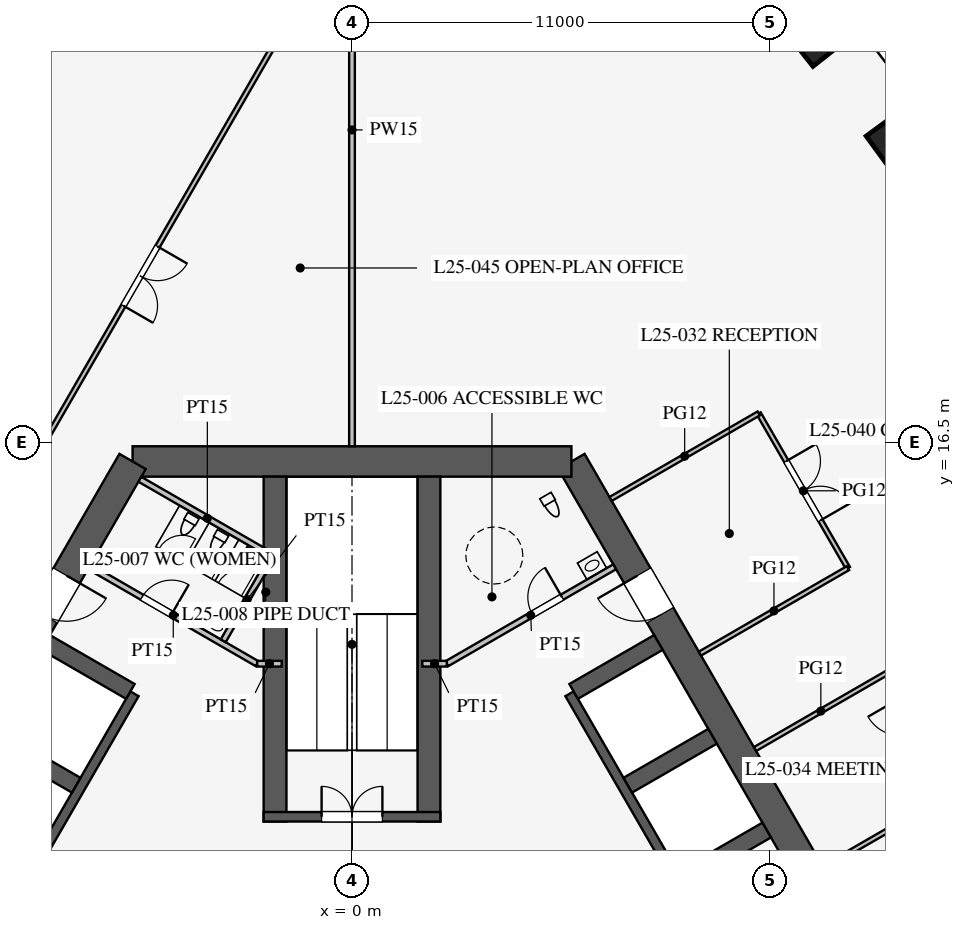
"""IFC4 building model, lengths in metres.
Left out: names, types, materials, properties, quantities, classifications, styles, units other than length and angle.
Written with IfcOpenShell. Run it as: python <this file> out.ifc"""

import sys

from ifc_helpers import new_model, si_unit, direction, frame, frame_2d, origin, origin_2d, place, context, subcontext, project, spatial, rectangle, extrude, element, fill, save


model = new_model("IFC4")
c1 = context("Model", 3, precision=1e-05, world=origin(), true_north=direction((0.0, 1.0)))
c2 = subcontext(c1, "Body", "Model", "MODEL_VIEW")
j1 = project(units=[si_unit("LENGTHUNIT", "METRE"), si_unit("PLANEANGLEUNIT", "RADIAN")], contexts=[c1])
p1 = place(None, origin())
s1 = spatial("IfcSite", under=j1, at=p1, CompositionType="ELEMENT")
p2 = place(p1, origin())
s2 = spatial("IfcBuilding", under=s1, at=p2, CompositionType="ELEMENT")
p3 = place(p2, frame((0.0, 0.0, 111.5)))
s3 = spatial("IfcBuildingStorey", under=s2, at=p3, CompositionType="ELEMENT", Elevation=111.5)
for number, where, z_axis, x_axis in (
    (1, (14.825, 24.148, 0.0), (0.0, 0.0, 1.0), (-0.591, 0.807, 0.0)),
    (2, (12.077, 27.757, 0.0), (0.0, 0.0, 1.0), (-0.62, 0.785, 0.0)),
):
    element("IfcColumn", number, at=place(p3, frame(where, z_axis=z_axis, x_axis=x_axis)), inside=s3, PredefinedType="COLUMN", context=c2, shape_type="SweptSolid", body=[
        extrude(rectangle(XDim=2.2, YDim=1.6, at=origin_2d()), origin(), (0.0, 0.0, 1.0), 4.2),
    ])
p4 = place(p3, frame((16.743, -3.0, 0.0), z_axis=(0.0, 0.0, 1.0), x_axis=(-0.500002442456, 0.866023993627, 0.0)))
e3 = element("IfcWall", 3, at=p4, inside=s3, PredefinedType="SHEAR", context=c2, shape_type="SweptSolid", body=[
    extrude(rectangle(XDim=21.939, YDim=0.8, at=frame_2d((10.97, 0.0))), origin(), (0.0, 0.0, 1.0), 4.2),
])
p5 = place(p4, frame((17.27, 0.0, 0.0)))
e4 = element("IfcOpeningElement", 4, at=p5, cuts=e3, PredefinedType="OPENING", context=c2, shape_type="SweptSolid", body=[
    extrude(rectangle(XDim=1.2, YDim=2.1, at=frame_2d((0.6, 1.05))), frame((0.0, 0.41, 0.0), z_axis=(0.0, -1.0, 0.0), x_axis=(1.0, 0.0, 0.0)), (0.0, 0.0, 1.0), 0.82),
])
p6 = place(p4, frame((3.47, 0.0, 0.0)))
e5 = element("IfcOpeningElement", 5, at=p6, cuts=e3, PredefinedType="OPENING", context=c2, shape_type="SweptSolid", body=[
    extrude(rectangle(XDim=1.2, YDim=2.1, at=frame_2d((0.6, 1.05))), frame((0.0, 0.41, 0.0), z_axis=(0.0, -1.0, 0.0), x_axis=(1.0, 0.0, 0.0)), (0.0, 0.0, 1.0), 0.82),
])
p7 = place(p3, frame((5.773, 16.0, 0.0), z_axis=(0.0, 0.0, 1.0), x_axis=(-1.0, 0.0, 0.0)))
e6 = element("IfcWall", 6, at=p7, inside=s3, PredefinedType="SHEAR", context=c2, shape_type="SweptSolid", body=[
    extrude(rectangle(XDim=11.547, YDim=0.8, at=frame_2d((5.773, 0.0))), origin(), (0.0, 0.0, 1.0), 4.2),
])
p8 = place(p3, frame((-5.773, 16.0, 0.0), z_axis=(0.0, 0.0, 1.0), x_axis=(-0.500002442456, -0.866023993627, 0.0)))
e7 = element("IfcWall", 7, at=p8, inside=s3, PredefinedType="SHEAR", context=c2, shape_type="SweptSolid", body=[
    extrude(rectangle(XDim=21.939, YDim=0.8, at=frame_2d((10.97, 0.0))), origin(), (0.0, 0.0, 1.0), 4.2),
])
p9 = place(p8, frame((17.27, 0.0, 0.0)))
e8 = element("IfcOpeningElement", 8, at=p9, cuts=e7, PredefinedType="OPENING", context=c2, shape_type="SweptSolid", body=[
    extrude(rectangle(XDim=1.2, YDim=2.1, at=frame_2d((0.6, 1.05))), frame((0.0, 0.41, 0.0), z_axis=(0.0, -1.0, 0.0), x_axis=(1.0, 0.0, 0.0)), (0.0, 0.0, 1.0), 0.82),
])
p10 = place(p8, frame((3.47, 0.0, 0.0)))
e9 = element("IfcOpeningElement", 9, at=p10, cuts=e7, PredefinedType="OPENING", context=c2, shape_type="SweptSolid", body=[
    extrude(rectangle(XDim=1.2, YDim=2.1, at=frame_2d((0.6, 1.05))), frame((0.0, 0.41, 0.0), z_axis=(0.0, -1.0, 0.0), x_axis=(1.0, 0.0, 0.0)), (0.0, 0.0, 1.0), 0.82),
])
p11 = place(p3, frame((11.424, 0.014, 0.0), z_axis=(0.0, 0.0, 1.0), x_axis=(-0.500001763848, 0.866024385424, 0.0)))
e10 = element("IfcWall", 10, at=p11, inside=s3, PredefinedType="SHEAR", context=c2, shape_type="SweptSolid", body=[
    extrude(rectangle(XDim=11.4, YDim=0.25, at=frame_2d((5.7, 0.0))), origin(), (0.0, 0.0, 1.0), 4.2),
])
p12 = place(p11, frame((0.975, 0.0, 0.0)))
e11 = element("IfcOpeningElement", 11, at=p12, cuts=e10, PredefinedType="OPENING", context=c2, shape_type="SweptSolid", body=[
    extrude(rectangle(XDim=0.9, YDim=2.1, at=frame_2d((0.45, 1.05))), frame((0.0, 0.135, 0.0), z_axis=(0.0, -1.0, 0.0), x_axis=(1.0, 0.0, 0.0)), (0.0, 0.0, 1.0), 0.27),
])
p13 = place(p11, frame((3.825, 0.0, 0.0)))
e12 = element("IfcOpeningElement", 12, at=p13, cuts=e10, PredefinedType="OPENING", context=c2, shape_type="SweptSolid", body=[
    extrude(rectangle(XDim=0.9, YDim=2.1, at=frame_2d((0.45, 1.05))), frame((0.0, 0.135, 0.0), z_axis=(0.0, -1.0, 0.0), x_axis=(1.0, 0.0, 0.0)), (0.0, 0.0, 1.0), 0.27),
])
for number, where, z_axis, x_axis in (
    (13, (8.682, 5.012, 0.0), (0.0, 0.0, 1.0), (0.866, 0.5, 0.0)),
    (14, (7.257, 7.481, 0.0), (0.0, 0.0, 1.0), (0.866, 0.5, 0.0)),
):
    element("IfcWall", number, at=place(p3, frame(where, z_axis=z_axis, x_axis=x_axis)), inside=s3, PredefinedType="SHEAR", context=c2, shape_type="SweptSolid", body=[
        extrude(rectangle(XDim=2.575, YDim=0.45, at=frame_2d((1.288, 0.0))), origin(), (0.0, 0.0, 1.0), 4.2),
    ])
p14 = place(p3, frame((5.832, 9.949, 0.0), z_axis=(0.0, 0.0, 1.0), x_axis=(0.866029291668, 0.499993265928, 0.0)))
e15 = element("IfcWall", 15, at=p14, inside=s3, PredefinedType="SHEAR", context=c2, shape_type="SweptSolid", body=[
    extrude(rectangle(XDim=2.575, YDim=0.45, at=frame_2d((1.288, 0.0))), origin(), (0.0, 0.0, 1.0), 4.2),
])
p15 = place(p3, frame((-5.724, 9.886, 0.0), z_axis=(0.0, 0.0, 1.0), x_axis=(-0.500001763848, -0.866024385424, 0.0)))
e16 = element("IfcWall", 16, at=p15, inside=s3, PredefinedType="SHEAR", context=c2, shape_type="SweptSolid", body=[
    extrude(rectangle(XDim=11.4, YDim=0.25, at=frame_2d((5.7, 0.0))), origin(), (0.0, 0.0, 1.0), 4.2),
])
p16 = place(p15, frame((6.525, 0.0, 0.0)))
e17 = element("IfcOpeningElement", 17, at=p16, cuts=e16, PredefinedType="OPENING", context=c2, shape_type="SweptSolid", body=[
    extrude(rectangle(XDim=1.2, YDim=2.2, at=frame_2d((0.6, 1.1))), frame((0.0, 0.135, 0.0), z_axis=(0.0, -1.0, 0.0), x_axis=(1.0, 0.0, 0.0)), (0.0, 0.0, 1.0), 0.27),
])
p17 = place(p15, frame((9.375, 0.0, 0.0)))
e18 = element("IfcOpeningElement", 18, at=p17, cuts=e16, PredefinedType="OPENING", context=c2, shape_type="SweptSolid", body=[
    extrude(rectangle(XDim=1.2, YDim=2.2, at=frame_2d((0.6, 1.1))), frame((0.0, 0.135, 0.0), z_axis=(0.0, -1.0, 0.0), x_axis=(1.0, 0.0, 0.0)), (0.0, 0.0, 1.0), 0.27),
])
p18 = place(p3, frame((-5.832, 9.949, 0.0), z_axis=(0.0, 0.0, 1.0), x_axis=(-0.866029291668, 0.499993265928, 0.0)))
e19 = element("IfcWall", 19, at=p18, inside=s3, PredefinedType="SHEAR", context=c2, shape_type="SweptSolid", body=[
    extrude(rectangle(XDim=2.575, YDim=0.45, at=frame_2d((1.288, 0.0))), origin(), (0.0, 0.0, 1.0), 4.2),
])
p19 = place(p3, frame((-7.257, 7.481, 0.0), z_axis=(0.0, 0.0, 1.0), x_axis=(-0.866046643894, 0.499963209246, 0.0)))
e20 = element("IfcWall", 20, at=p19, inside=s3, PredefinedType="SHEAR", context=c2, shape_type="SweptSolid", body=[
    extrude(rectangle(XDim=2.575, YDim=0.45, at=frame_2d((1.288, 0.0))), origin(), (0.0, 0.0, 1.0), 4.2),
])
for number, where, z_axis, x_axis in (
    (21, (2.025, 6.525, 0.0), (0.0, 0.0, 1.0), (0.0, 1.0, 0.0)),
    (22, (-2.025, 6.525, 0.0), (0.0, 0.0, 1.0), (0.0, 1.0, 0.0)),
):
    element("IfcWall", number, at=place(p3, frame(where, z_axis=z_axis, x_axis=x_axis)), inside=s3, PredefinedType="SHEAR", context=c2, shape_type="SweptSolid", body=[
        extrude(rectangle(XDim=9.075, YDim=0.6, at=frame_2d((4.538, 0.0))), origin(), (0.0, 0.0, 1.0), 4.2),
    ])
p20 = place(p3, frame((2.325, 6.65, 0.0), z_axis=(0.0, 0.0, 1.0), x_axis=(-1.0, 0.0, 0.0)))
e23 = element("IfcWall", 23, at=p20, inside=s3, PredefinedType="SHEAR", context=c2, shape_type="SweptSolid", body=[
    extrude(rectangle(XDim=4.65, YDim=0.25, at=frame_2d((2.325, 0.0))), origin(), (0.0, 0.0, 1.0), 4.2),
])
p21 = place(p20, frame((1.525, 0.0, 0.0)))
e24 = element("IfcOpeningElement", 24, at=p21, cuts=e23, PredefinedType="OPENING", context=c2, shape_type="SweptSolid", body=[
    extrude(rectangle(XDim=1.6, YDim=2.1, at=frame_2d((0.8, 1.05))), frame((0.0, 0.135, 0.0), z_axis=(0.0, -1.0, 0.0), x_axis=(1.0, 0.0, 0.0)), (0.0, 0.0, 1.0), 0.27),
])
p22 = place(p3, frame((2.495, 10.678, 0.0), z_axis=(0.0, 0.0, 1.0), x_axis=(0.86602216432, 0.500005610874, 0.0)))
e25 = element("IfcWall", 25, at=p22, inside=s3, PredefinedType="PARTITIONING", context=c2, shape_type="SweptSolid", body=[
    extrude(rectangle(XDim=5.1, YDim=0.15, at=frame_2d((2.55, 0.0))), origin(), (0.0, 0.0, 1.0), 4.0),
])
p23 = place(p22, frame((2.6, 0.0, 0.0)))
e26 = element("IfcOpeningElement", 26, at=p23, cuts=e25, PredefinedType="OPENING", context=c2, shape_type="SweptSolid", body=[
    extrude(rectangle(XDim=0.9, YDim=2.1, at=frame_2d((0.45, 1.05))), frame((0.0, 0.085, 0.0), z_axis=(0.0, -1.0, 0.0), x_axis=(1.0, 0.0, 0.0)), (0.0, 0.0, 1.0), 0.17),
])
p24 = place(p3, frame((-2.495, 10.678, 0.0), z_axis=(0.0, 0.0, 1.0), x_axis=(-0.86602216432, 0.500005610874, 0.0)))
e27 = element("IfcWall", 27, at=p24, inside=s3, PredefinedType="PARTITIONING", context=c2, shape_type="SweptSolid", body=[
    extrude(rectangle(XDim=5.1, YDim=0.15, at=frame_2d((2.55, 0.0))), origin(), (0.0, 0.0, 1.0), 4.0),
])
p25 = place(p24, frame((2.6, 0.0, 0.0)))
e28 = element("IfcOpeningElement", 28, at=p25, cuts=e27, PredefinedType="OPENING", context=c2, shape_type="SweptSolid", body=[
    extrude(rectangle(XDim=0.9, YDim=2.1, at=frame_2d((0.45, 1.05))), frame((0.0, 0.085, 0.0), z_axis=(0.0, -1.0, 0.0), x_axis=(1.0, 0.0, 0.0)), (0.0, 0.0, 1.0), 0.17),
])
for number, where, z_axis, x_axis in (
    (29, (2.495, 10.678, 0.0), (0.0, 0.0, 1.0), (-1.0, 0.0, 0.0)),
    (30, (-2.495, 10.678, 0.0), (0.0, 0.0, 1.0), (1.0, 0.0, 0.0)),
):
    element("IfcWall", number, at=place(p3, frame(where, z_axis=z_axis, x_axis=x_axis)), inside=s3, PredefinedType="PARTITIONING", context=c2, shape_type="SweptSolid", body=[
        extrude(rectangle(XDim=0.645, YDim=0.15, at=frame_2d((0.323, 0.0))), origin(), (0.0, 0.0, 1.0), 4.0),
    ])
p26 = place(p3, frame((-2.031, 13.482, 0.0), z_axis=(0.0, 0.0, 1.0), x_axis=(-0.866050731258, 0.499956128963, 0.0)))
e31 = element("IfcWall", 31, at=p26, inside=s3, PredefinedType="PARTITIONING", context=c2, shape_type="SweptSolid", body=[
    extrude(rectangle(XDim=4.1, YDim=0.15, at=frame_2d((2.05, 0.0))), origin(), (0.0, 0.0, 1.0), 4.0),
])
p27 = place(p3, frame((-3.389, 11.281, 0.0), z_axis=(0.0, 0.0, 1.0), x_axis=(0.499989096993, 0.866031698547, 0.0)))
e32 = element("IfcWall", 32, at=p27, inside=s3, PredefinedType="PARTITIONING", context=c2, shape_type="SweptSolid", body=[
    extrude(rectangle(XDim=2.51, YDim=0.15, at=frame_2d((1.255, 0.0))), origin(), (0.0, 0.0, 1.0), 4.0),
])
p28 = place(p3, frame((0.0, 16.4, 0.0), z_axis=(0.0, 0.0, 1.0), x_axis=(0.0, 1.0, 0.0)))
e33 = element("IfcWall", 33, at=p28, inside=s3, PredefinedType="PARTITIONING", context=c2, shape_type="SweptSolid", body=[
    extrude(rectangle(XDim=16.65, YDim=0.15, at=frame_2d((8.325, 0.0))), origin(), (0.0, 0.0, 1.0), 2.3),
])
p29 = place(p3, frame((13.052, 13.194, 0.0), z_axis=(0.0, 0.0, 1.0), x_axis=(-0.499977259774, 0.866038532462, 0.0)))
e34 = element("IfcWall", 34, at=p29, inside=s3, PredefinedType="PARTITIONING", context=c2, shape_type="SweptSolid", body=[
    extrude(rectangle(XDim=4.7, YDim=0.12, at=frame_2d((2.35, 0.0))), origin(), (0.0, 0.0, 1.0), 2.9),
])
p30 = place(p29, frame((1.45, 0.0, 0.15)))
e35 = element("IfcOpeningElement", 35, at=p30, cuts=e34, PredefinedType="OPENING", context=c2, shape_type="SweptSolid", body=[
    extrude(rectangle(XDim=1.8, YDim=2.1, at=frame_2d((0.9, 1.05))), frame((0.0, 0.07, 0.0), z_axis=(0.0, -1.0, 0.0), x_axis=(1.0, 0.0, 0.0)), (0.0, 0.0, 1.0), 0.14),
])
p31 = place(p3, frame((15.869, 7.314, 0.0), z_axis=(0.0, 0.0, 1.0), x_axis=(-0.500012057535, 0.866018442252, 0.0)))
e36 = element("IfcWall", 36, at=p31, inside=s3, PredefinedType="PARTITIONING", context=c2, shape_type="SweptSolid", body=[
    extrude(rectangle(XDim=3.6, YDim=0.12, at=frame_2d((1.8, 0.0))), origin(), (0.0, 0.0, 1.0), 2.9),
])
p32 = place(p31, frame((1.85, 0.0, 0.15)))
e37 = element("IfcOpeningElement", 37, at=p32, cuts=e36, PredefinedType="OPENING", context=c2, shape_type="SweptSolid", body=[
    extrude(rectangle(XDim=1.0, YDim=2.1, at=frame_2d((0.5, 1.05))), frame((0.0, 0.07, 0.0), z_axis=(0.0, -1.0, 0.0), x_axis=(1.0, 0.0, 0.0)), (0.0, 0.0, 1.0), 0.14),
])
p33 = place(p3, frame((10.605, 8.432, 0.0), z_axis=(0.0, 0.0, 1.0), x_axis=(0.866026010844, 0.49999894854, 0.0)))
e38 = element("IfcWall", 38, at=p33, inside=s3, PredefinedType="PARTITIONING", context=c2, shape_type="SweptSolid", body=[
    extrude(rectangle(XDim=4.0, YDim=0.12, at=frame_2d((2.0, 0.0))), origin(), (0.0, 0.0, 1.0), 2.9),
])
p34 = place(p3, frame((9.155, 10.944, 0.0), z_axis=(0.0, 0.0, 1.0), x_axis=(0.866017533419, 0.500013631625, 0.0)))
e39 = element("IfcWall", 39, at=p34, inside=s3, PredefinedType="PARTITIONING", context=c2, shape_type="SweptSolid", body=[
    extrude(rectangle(XDim=4.5, YDim=0.12, at=frame_2d((2.25, 0.0))), origin(), (0.0, 0.0, 1.0), 2.9),
])
p35 = place(p3, frame((6.805, 15.014, 0.0), z_axis=(0.0, 0.0, 1.0), x_axis=(0.866031096941, 0.499990139034, 0.0)))
e40 = element("IfcWall", 40, at=p35, inside=s3, PredefinedType="PARTITIONING", context=c2, shape_type="SweptSolid", body=[
    extrude(rectangle(XDim=4.5, YDim=0.12, at=frame_2d((2.25, 0.0))), origin(), (0.0, 0.0, 1.0), 2.9),
])
p36 = place(p3, frame((12.405, 5.314, 0.0), z_axis=(0.0, 0.0, 1.0), x_axis=(0.866026010844, 0.49999894854, 0.0)))
e41 = element("IfcWall", 41, at=p36, inside=s3, PredefinedType="PARTITIONING", context=c2, shape_type="SweptSolid", body=[
    extrude(rectangle(XDim=4.0, YDim=0.12, at=frame_2d((2.0, 0.0))), origin(), (0.0, 0.0, 1.0), 2.9),
])
p37 = place(p3, frame((-0.016, 30.491, 0.0), z_axis=(0.0, 0.0, 1.0), x_axis=(-0.50000091641, -0.866024874695, 0.0)))
e42 = element("IfcWall", 42, at=p37, inside=s3, PredefinedType="PARTITIONING", context=c2, shape_type="SweptSolid", body=[
    extrude(rectangle(XDim=52.796, YDim=0.12, at=frame_2d((26.398, 0.0))), origin(), (0.0, 0.0, 1.0), 2.9),
])
p38 = place(p37, frame((10.2, 0.0, 0.15)))
e43 = element("IfcOpeningElement", 43, at=p38, cuts=e42, PredefinedType="OPENING", context=c2, shape_type="SweptSolid", body=[
    extrude(rectangle(XDim=1.8, YDim=2.1, at=frame_2d((0.9, 1.05))), frame((0.0, 0.07, 0.0), z_axis=(0.0, -1.0, 0.0), x_axis=(1.0, 0.0, 0.0)), (0.0, 0.0, 1.0), 0.14),
])
p39 = place(p37, frame((40.8, 0.0, 0.15)))
e44 = element("IfcOpeningElement", 44, at=p39, cuts=e42, PredefinedType="OPENING", context=c2, shape_type="SweptSolid", body=[
    extrude(rectangle(XDim=1.8, YDim=2.1, at=frame_2d((0.9, 1.05))), frame((0.0, 0.07, 0.0), z_axis=(0.0, -1.0, 0.0), x_axis=(1.0, 0.0, 0.0)), (0.0, 0.0, 1.0), 0.14),
])
p40 = place(p23, origin())
e45 = element("IfcDoor", 45, at=p40, inside=s3, OperationType="SINGLE_SWING_RIGHT", PredefinedType="DOOR", context=c2, shape_type="SweptSolid", body=[
    extrude(rectangle(XDim=0.9, YDim=2.1, at=frame_2d((0.45, 1.05))), frame((0.0, 0.025, 0.0), z_axis=(0.0, -1.0, 0.0), x_axis=(1.0, 0.0, 0.0)), (0.0, 0.0, 1.0), 0.05),
])
fill(e26, e45)
p41 = place(p25, frame((0.9, 0.0, 0.0), z_axis=(0.0, 0.0, 1.0), x_axis=(-1.0, 0.0, 0.0)))
e46 = element("IfcDoor", 46, at=p41, inside=s3, OperationType="SINGLE_SWING_RIGHT", PredefinedType="DOOR", context=c2, shape_type="SweptSolid", body=[
    extrude(rectangle(XDim=0.9, YDim=2.1, at=frame_2d((0.45, 1.05))), frame((0.0, 0.025, 0.0), z_axis=(0.0, -1.0, 0.0), x_axis=(1.0, 0.0, 0.0)), (0.0, 0.0, 1.0), 0.05),
])
fill(e28, e46)
p42 = place(p21, frame((1.6, 0.0, 0.0), z_axis=(0.0, 0.0, 1.0), x_axis=(-1.0, 0.0, 0.0)))
e47 = element("IfcDoor", 47, at=p42, inside=s3, OperationType="DOUBLE_DOOR_SINGLE_SWING", PredefinedType="DOOR", context=c2, shape_type="SweptSolid", body=[
    extrude(rectangle(XDim=1.6, YDim=2.1, at=frame_2d((0.8, 1.05))), frame((0.0, 0.025, 0.0), z_axis=(0.0, -1.0, 0.0), x_axis=(1.0, 0.0, 0.0)), (0.0, 0.0, 1.0), 0.05),
])
fill(e24, e47)
p43 = place(p5, origin())
e48 = element("IfcDoor", 48, at=p43, inside=s3, OperationType="SINGLE_SWING_RIGHT", PredefinedType="DOOR", context=c2, shape_type="SweptSolid", body=[
    extrude(rectangle(XDim=1.2, YDim=2.1, at=frame_2d((0.6, 1.05))), frame((0.0, 0.025, 0.0), z_axis=(0.0, -1.0, 0.0), x_axis=(1.0, 0.0, 0.0)), (0.0, 0.0, 1.0), 0.05),
])
fill(e4, e48)
p44 = place(p10, origin())
e49 = element("IfcDoor", 49, at=p44, inside=s3, OperationType="SINGLE_SWING_LEFT", PredefinedType="DOOR", context=c2, shape_type="SweptSolid", body=[
    extrude(rectangle(XDim=1.2, YDim=2.1, at=frame_2d((0.6, 1.05))), frame((0.0, 0.025, 0.0), z_axis=(0.0, -1.0, 0.0), x_axis=(1.0, 0.0, 0.0)), (0.0, 0.0, 1.0), 0.05),
])
fill(e9, e49)
p45 = place(p30, frame((1.8, 0.0, 0.0), z_axis=(0.0, 0.0, 1.0), x_axis=(-1.0, 0.0, 0.0)))
e50 = element("IfcDoor", 50, at=p45, inside=s3, OperationType="DOUBLE_DOOR_SINGLE_SWING", PredefinedType="DOOR", context=c2, shape_type="SweptSolid", body=[
    extrude(rectangle(XDim=1.8, YDim=2.1, at=frame_2d((0.9, 1.05))), frame((0.0, 0.025, 0.0), z_axis=(0.0, -1.0, 0.0), x_axis=(1.0, 0.0, 0.0)), (0.0, 0.0, 1.0), 0.05),
])
fill(e35, e50)
p46 = place(p38, origin())
e51 = element("IfcDoor", 51, at=p46, inside=s3, OperationType="DOUBLE_DOOR_SINGLE_SWING", PredefinedType="DOOR", context=c2, shape_type="SweptSolid", body=[
    extrude(rectangle(XDim=1.8, YDim=2.1, at=frame_2d((0.9, 1.05))), frame((0.0, 0.025, 0.0), z_axis=(0.0, -1.0, 0.0), x_axis=(1.0, 0.0, 0.0)), (0.0, 0.0, 1.0), 0.05),
])
fill(e43, e51)
save(model, sys.argv[1])
